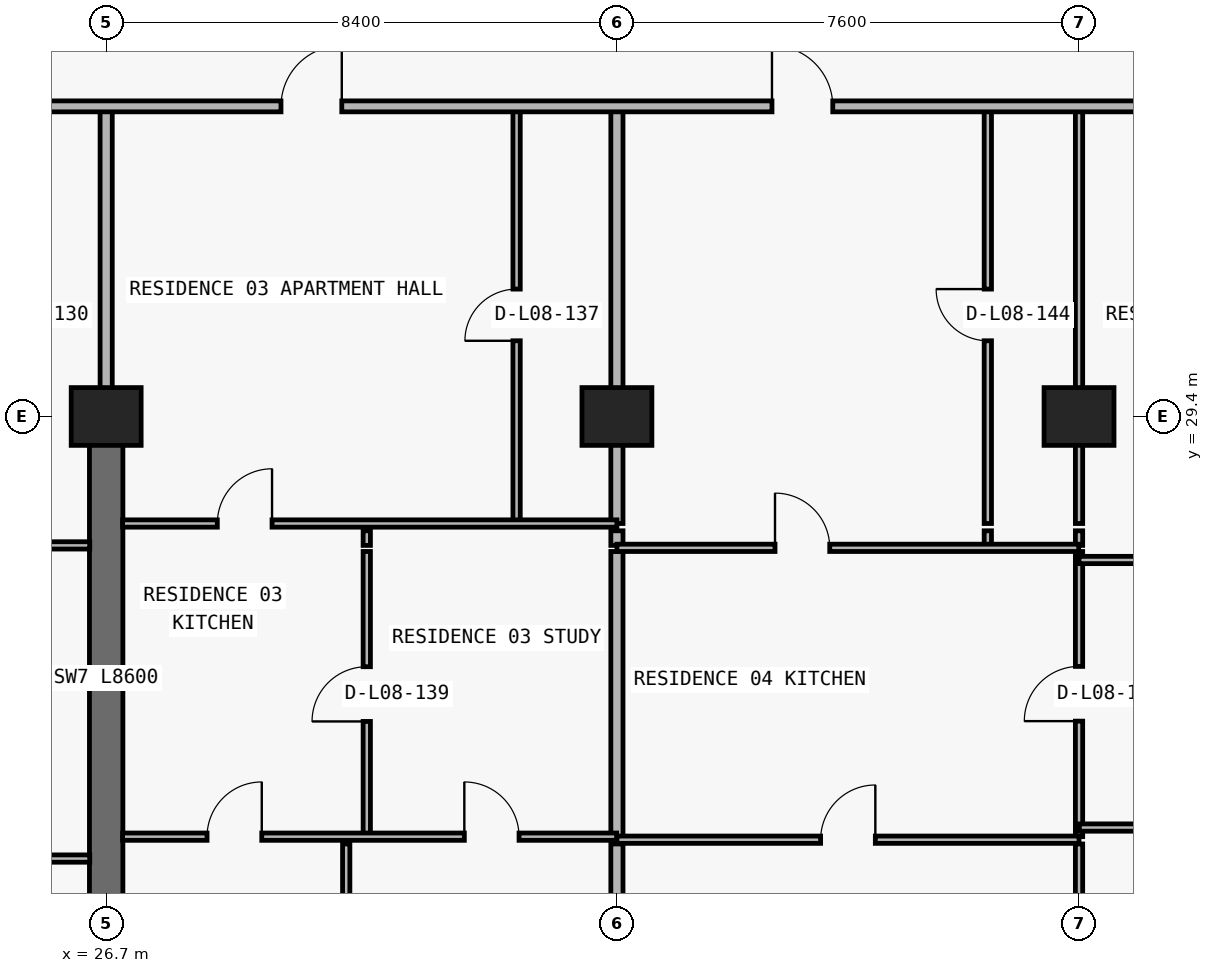
"""IFC4 building model, lengths in metres.
Left out: names, types, materials, properties, quantities, classifications, styles, units other than length and angle.
Written with IfcOpenShell. Run it as: python <this file> out.ifc"""

import sys

from ifc_helpers import new_model, si_unit, direction, frame, frame_2d, origin, origin_2d, place, context, subcontext, project, spatial, rectangle, extrude, element, fill, save


model = new_model("IFC4")
c1 = context("Model", 3, precision=1e-05, world=origin(), true_north=direction((0.0, 1.0)))
c2 = subcontext(c1, "Body", "Model", "MODEL_VIEW")
j1 = project(units=[si_unit("LENGTHUNIT", "METRE"), si_unit("PLANEANGLEUNIT", "RADIAN")], contexts=[c1])
p1 = place(None, origin())
s1 = spatial("IfcSite", under=j1, at=p1, CompositionType="ELEMENT")
p2 = place(p1, origin())
s2 = spatial("IfcBuilding", under=s1, at=p2, CompositionType="ELEMENT")
p3 = place(p2, frame((0.0, 0.0, 36.6)))
s3 = spatial("IfcBuildingStorey", under=s2, at=p3, CompositionType="ELEMENT", Elevation=36.6)
for number, where, z_axis, x_axis in (
    (1, (26.7, 29.4, 0.0), (0.0, 0.0, 1.0), (1.0, 0.0, 0.0)),
    (2, (35.1, 29.4, 0.0), (0.0, 0.0, 1.0), (1.0, 0.0, 0.0)),
    (3, (42.7, 29.4, 0.0), (0.0, 0.0, 1.0), (1.0, 0.0, 0.0)),
):
    element("IfcColumn", number, at=place(p3, frame(where, z_axis=z_axis, x_axis=x_axis)), inside=s3, PredefinedType="COLUMN", context=c2, shape_type="SweptSolid", body=[
        extrude(rectangle(XDim=1.15, YDim=0.95, at=origin_2d()), origin(), (0.0, 0.0, 1.0), 3.05),
    ])
p4 = place(p3, frame((26.7, 20.8, 0.0), z_axis=(0.0, 0.0, 1.0), x_axis=(0.0, 1.0, 0.0)))
e4 = element("IfcWall", 4, at=p4, inside=s3, PredefinedType="SHEAR", context=c2, shape_type="SweptSolid", body=[
    extrude(rectangle(XDim=8.6, YDim=0.55, at=frame_2d((4.3, 0.0))), origin(), (0.0, 0.0, 1.0), 3.05),
])
p5 = place(p3, frame((26.7, 29.405, 0.0), z_axis=(0.0, 0.0, 1.0), x_axis=(0.0, 1.0, 0.0)))
e5 = element("IfcWall", 5, at=p5, inside=s3, PredefinedType="PARTITIONING", context=c2, shape_type="SweptSolid", body=[
    extrude(rectangle(XDim=5.095, YDim=0.2, at=frame_2d((2.547, 0.0))), origin(), (0.0, 0.0, 1.0), 2.335),
])
p6 = place(p3, frame((30.648, 6.24, 0.0), z_axis=(0.0, 0.0, 1.0), x_axis=(0.0, 1.0, 0.0)))
e6 = element("IfcWall", 6, at=p6, inside=s3, PredefinedType="PARTITIONING", context=c2, shape_type="SweptSolid", body=[
    extrude(rectangle(XDim=16.13, YDim=0.12, at=frame_2d((8.065, 0.0))), origin(), (0.0, 0.0, 1.0), 3.05),
])
p7 = place(p3, frame((30.986, 22.49, 0.0), z_axis=(0.0, 0.0, 1.0), x_axis=(0.0, 1.0, 0.0)))
e7 = element("IfcWall", 7, at=p7, inside=s3, PredefinedType="PARTITIONING", context=c2, shape_type="SweptSolid", body=[
    extrude(rectangle(XDim=4.69, YDim=0.12, at=frame_2d((2.345, 0.0))), origin(), (0.0, 0.0, 1.0), 3.05),
])
p8 = place(p7, frame((1.895, 0.0, 0.0)))
e8 = element("IfcOpeningElement", 8, at=p8, cuts=e7, PredefinedType="OPENING", context=c2, shape_type="SweptSolid", body=[
    extrude(rectangle(XDim=0.9, YDim=2.15, at=frame_2d((0.45, 1.075))), frame((0.0, 0.07, 0.0), z_axis=(0.0, -1.0, 0.0), x_axis=(1.0, 0.0, 0.0)), (0.0, 0.0, 1.0), 0.14),
])
p9 = place(p3, frame((30.986, 27.28, 0.0), z_axis=(0.0, 0.0, 1.0), x_axis=(0.0, 1.0, 0.0)))
e9 = element("IfcWall", 9, at=p9, inside=s3, PredefinedType="PARTITIONING", context=c2, shape_type="SweptSolid", body=[
    extrude(rectangle(XDim=0.24, YDim=0.12, at=frame_2d((0.12, 0.0))), origin(), (0.0, 0.0, 1.0), 3.05),
])
p10 = place(p3, frame((33.45, 27.64, 0.0), z_axis=(0.0, 0.0, 1.0), x_axis=(0.0, 1.0, 0.0)))
e10 = element("IfcWall", 10, at=p10, inside=s3, PredefinedType="PARTITIONING", context=c2, shape_type="SweptSolid", body=[
    extrude(rectangle(XDim=6.86, YDim=0.12, at=frame_2d((3.43, 0.0))), origin(), (0.0, 0.0, 1.0), 3.05),
])
p11 = place(p10, frame((3.005, 0.0, 0.0)))
e11 = element("IfcOpeningElement", 11, at=p11, cuts=e10, PredefinedType="OPENING", context=c2, shape_type="SweptSolid", body=[
    extrude(rectangle(XDim=0.85, YDim=2.1, at=frame_2d((0.425, 1.05))), frame((0.0, 0.07, 0.0), z_axis=(0.0, -1.0, 0.0), x_axis=(1.0, 0.0, 0.0)), (0.0, 0.0, 1.0), 0.14),
])
p12 = place(p3, frame((35.1, 6.24, 0.0), z_axis=(0.0, 0.0, 1.0), x_axis=(0.0, 1.0, 0.0)))
e12 = element("IfcWall", 12, at=p12, inside=s3, PredefinedType="PARTITIONING", context=c2, shape_type="SweptSolid", body=[
    extrude(rectangle(XDim=16.13, YDim=0.2, at=frame_2d((8.065, 0.0))), origin(), (0.0, 0.0, 1.0), 2.11),
])
p13 = place(p3, frame((35.1, 22.49, 0.0), z_axis=(0.0, 0.0, 1.0), x_axis=(0.0, 1.0, 0.0)))
e13 = element("IfcWall", 13, at=p13, inside=s3, PredefinedType="PARTITIONING", context=c2, shape_type="SweptSolid", body=[
    extrude(rectangle(XDim=4.69, YDim=0.2, at=frame_2d((2.345, 0.0))), origin(), (0.0, 0.0, 1.0), 2.11),
])
p14 = place(p3, frame((35.1, 27.28, 0.0), z_axis=(0.0, 0.0, 1.0), x_axis=(0.0, 1.0, 0.0)))
e14 = element("IfcWall", 14, at=p14, inside=s3, PredefinedType="PARTITIONING", context=c2, shape_type="SweptSolid", body=[
    extrude(rectangle(XDim=0.24, YDim=0.2, at=frame_2d((0.12, 0.0))), origin(), (0.0, 0.0, 1.0), 2.11),
])
p15 = place(p3, frame((35.1, 27.64, 0.0), z_axis=(0.0, 0.0, 1.0), x_axis=(0.0, 1.0, 0.0)))
e15 = element("IfcWall", 15, at=p15, inside=s3, PredefinedType="PARTITIONING", context=c2, shape_type="SweptSolid", body=[
    extrude(rectangle(XDim=6.86, YDim=0.2, at=frame_2d((3.43, 0.0))), origin(), (0.0, 0.0, 1.0), 2.11),
])
p16 = place(p3, frame((41.2, 27.28, 0.0), z_axis=(0.0, 0.0, 1.0), x_axis=(0.0, 1.0, 0.0)))
e16 = element("IfcWall", 16, at=p16, inside=s3, PredefinedType="PARTITIONING", context=c2, shape_type="SweptSolid", body=[
    extrude(rectangle(XDim=0.24, YDim=0.12, at=frame_2d((0.12, 0.0))), origin(), (0.0, 0.0, 1.0), 3.05),
])
p17 = place(p3, frame((41.2, 27.64, 0.0), z_axis=(0.0, 0.0, 1.0), x_axis=(0.0, 1.0, 0.0)))
e17 = element("IfcWall", 17, at=p17, inside=s3, PredefinedType="PARTITIONING", context=c2, shape_type="SweptSolid", body=[
    extrude(rectangle(XDim=6.86, YDim=0.12, at=frame_2d((3.43, 0.0))), origin(), (0.0, 0.0, 1.0), 3.05),
])
p18 = place(p17, frame((3.005, 0.0, 0.0)))
e18 = element("IfcOpeningElement", 18, at=p18, cuts=e17, PredefinedType="OPENING", context=c2, shape_type="SweptSolid", body=[
    extrude(rectangle(XDim=0.85, YDim=2.1, at=frame_2d((0.425, 1.05))), frame((0.0, 0.07, 0.0), z_axis=(0.0, -1.0, 0.0), x_axis=(1.0, 0.0, 0.0)), (0.0, 0.0, 1.0), 0.14),
])
p19 = place(p3, frame((42.7, 6.24, 0.0), z_axis=(0.0, 0.0, 1.0), x_axis=(0.0, 1.0, 0.0)))
e19 = element("IfcWall", 19, at=p19, inside=s3, PredefinedType="PARTITIONING", context=c2, shape_type="SweptSolid", body=[
    extrude(rectangle(XDim=16.13, YDim=0.12, at=frame_2d((8.065, 0.0))), origin(), (0.0, 0.0, 1.0), 2.11),
])
p20 = place(p3, frame((42.7, 22.49, 0.0), z_axis=(0.0, 0.0, 1.0), x_axis=(0.0, 1.0, 0.0)))
e20 = element("IfcWall", 20, at=p20, inside=s3, PredefinedType="PARTITIONING", context=c2, shape_type="SweptSolid", body=[
    extrude(rectangle(XDim=4.69, YDim=0.12, at=frame_2d((2.345, 0.0))), origin(), (0.0, 0.0, 1.0), 2.11),
])
p21 = place(p20, frame((1.9, 0.0, 0.0)))
e21 = element("IfcOpeningElement", 21, at=p21, cuts=e20, PredefinedType="OPENING", context=c2, shape_type="SweptSolid", body=[
    extrude(rectangle(XDim=0.9, YDim=2.06, at=frame_2d((0.45, 1.03))), frame((0.0, 0.07, 0.0), z_axis=(0.0, -1.0, 0.0), x_axis=(1.0, 0.0, 0.0)), (0.0, 0.0, 1.0), 0.14),
])
p22 = place(p3, frame((42.7, 27.28, 0.0), z_axis=(0.0, 0.0, 1.0), x_axis=(0.0, 1.0, 0.0)))
e22 = element("IfcWall", 22, at=p22, inside=s3, PredefinedType="PARTITIONING", context=c2, shape_type="SweptSolid", body=[
    extrude(rectangle(XDim=0.24, YDim=0.12, at=frame_2d((0.12, 0.0))), origin(), (0.0, 0.0, 1.0), 2.11),
])
p23 = place(p3, frame((42.7, 27.64, 0.0), z_axis=(0.0, 0.0, 1.0), x_axis=(0.0, 1.0, 0.0)))
e23 = element("IfcWall", 23, at=p23, inside=s3, PredefinedType="PARTITIONING", context=c2, shape_type="SweptSolid", body=[
    extrude(rectangle(XDim=6.86, YDim=0.12, at=frame_2d((3.43, 0.0))), origin(), (0.0, 0.0, 1.0), 2.11),
])
p24 = place(p3, frame((18.3, 22.13, 0.0), z_axis=(0.0, 0.0, 1.0), x_axis=(1.0, 0.0, 0.0)))
e24 = element("IfcWall", 24, at=p24, inside=s3, PredefinedType="PARTITIONING", context=c2, shape_type="SweptSolid", body=[
    extrude(rectangle(XDim=8.13, YDim=0.12, at=frame_2d((4.065, 0.0))), origin(), (0.0, 0.0, 1.0), 3.05),
])
p25 = place(p24, frame((1.86, 0.0, 0.0)))
e25 = element("IfcOpeningElement", 25, at=p25, cuts=e24, PredefinedType="OPENING", context=c2, shape_type="SweptSolid", body=[
    extrude(rectangle(XDim=0.9, YDim=2.15, at=frame_2d((0.45, 1.075))), frame((0.0, 0.07, 0.0), z_axis=(0.0, -1.0, 0.0), x_axis=(1.0, 0.0, 0.0)), (0.0, 0.0, 1.0), 0.14),
])
p26 = place(p24, frame((6.008, 0.0, 0.0)))
e26 = element("IfcOpeningElement", 26, at=p26, cuts=e24, PredefinedType="OPENING", context=c2, shape_type="SweptSolid", body=[
    extrude(rectangle(XDim=0.9, YDim=2.15, at=frame_2d((0.45, 1.075))), frame((0.0, 0.07, 0.0), z_axis=(0.0, -1.0, 0.0), x_axis=(1.0, 0.0, 0.0)), (0.0, 0.0, 1.0), 0.14),
])
p27 = place(p3, frame((35.1, 22.44, 0.0), z_axis=(0.0, 0.0, 1.0), x_axis=(1.0, 0.0, 0.0)))
e27 = element("IfcWall", 27, at=p27, inside=s3, PredefinedType="PARTITIONING", context=c2, shape_type="SweptSolid", body=[
    extrude(rectangle(XDim=7.6, YDim=0.12, at=frame_2d((3.8, 0.0))), origin(), (0.0, 0.0, 1.0), 3.05),
])
p28 = place(p27, frame((3.35, 0.0, 0.0)))
e28 = element("IfcOpeningElement", 28, at=p28, cuts=e27, PredefinedType="OPENING", context=c2, shape_type="SweptSolid", body=[
    extrude(rectangle(XDim=0.9, YDim=2.15, at=frame_2d((0.45, 1.075))), frame((0.0, 0.07, 0.0), z_axis=(0.0, -1.0, 0.0), x_axis=(1.0, 0.0, 0.0)), (0.0, 0.0, 1.0), 0.14),
])
p29 = place(p3, frame((26.97, 22.49, 0.0), z_axis=(0.0, 0.0, 1.0), x_axis=(1.0, 0.0, 0.0)))
e29 = element("IfcWall", 29, at=p29, inside=s3, PredefinedType="PARTITIONING", context=c2, shape_type="SweptSolid", body=[
    extrude(rectangle(XDim=8.125, YDim=0.12, at=frame_2d((4.062, 0.0))), origin(), (0.0, 0.0, 1.0), 3.05),
])
p30 = place(p29, frame((1.389, 0.0, 0.0)))
e30 = element("IfcOpeningElement", 30, at=p30, cuts=e29, PredefinedType="OPENING", context=c2, shape_type="SweptSolid", body=[
    extrude(rectangle(XDim=0.9, YDim=2.15, at=frame_2d((0.45, 1.075))), frame((0.0, 0.07, 0.0), z_axis=(0.0, -1.0, 0.0), x_axis=(1.0, 0.0, 0.0)), (0.0, 0.0, 1.0), 0.14),
])
p31 = place(p29, frame((5.621, 0.0, 0.0)))
e31 = element("IfcOpeningElement", 31, at=p31, cuts=e29, PredefinedType="OPENING", context=c2, shape_type="SweptSolid", body=[
    extrude(rectangle(XDim=0.9, YDim=2.15, at=frame_2d((0.45, 1.075))), frame((0.0, 0.07, 0.0), z_axis=(0.0, -1.0, 0.0), x_axis=(1.0, 0.0, 0.0)), (0.0, 0.0, 1.0), 0.14),
])
p32 = place(p3, frame((42.705, 22.64, 0.0), z_axis=(0.0, 0.0, 1.0), x_axis=(1.0, 0.0, 0.0)))
e32 = element("IfcWall", 32, at=p32, inside=s3, PredefinedType="PARTITIONING", context=c2, shape_type="SweptSolid", body=[
    extrude(rectangle(XDim=8.125, YDim=0.12, at=frame_2d((4.062, 0.0))), origin(), (0.0, 0.0, 1.0), 3.05),
])
p33 = place(p32, frame((3.613, 0.0, 0.0)))
e33 = element("IfcOpeningElement", 33, at=p33, cuts=e32, PredefinedType="OPENING", context=c2, shape_type="SweptSolid", body=[
    extrude(rectangle(XDim=0.9, YDim=2.15, at=frame_2d((0.45, 1.075))), frame((0.0, 0.07, 0.0), z_axis=(0.0, -1.0, 0.0), x_axis=(1.0, 0.0, 0.0)), (0.0, 0.0, 1.0), 0.14),
])
p34 = place(p3, frame((42.7, 27.04, 0.0), z_axis=(0.0, 0.0, 1.0), x_axis=(1.0, 0.0, 0.0)))
e34 = element("IfcWall", 34, at=p34, inside=s3, PredefinedType="PARTITIONING", context=c2, shape_type="SweptSolid", body=[
    extrude(rectangle(XDim=8.13, YDim=0.12, at=frame_2d((4.065, 0.0))), origin(), (0.0, 0.0, 1.0), 3.05),
])
p35 = place(p34, frame((3.0, 0.0, 0.0)))
e35 = element("IfcOpeningElement", 35, at=p35, cuts=e34, PredefinedType="OPENING", context=c2, shape_type="SweptSolid", body=[
    extrude(rectangle(XDim=0.9, YDim=2.15, at=frame_2d((0.45, 1.075))), frame((0.0, 0.07, 0.0), z_axis=(0.0, -1.0, 0.0), x_axis=(1.0, 0.0, 0.0)), (0.0, 0.0, 1.0), 0.14),
])
p36 = place(p3, frame((35.1, 27.24, 0.0), z_axis=(0.0, 0.0, 1.0), x_axis=(1.0, 0.0, 0.0)))
e36 = element("IfcWall", 36, at=p36, inside=s3, PredefinedType="PARTITIONING", context=c2, shape_type="SweptSolid", body=[
    extrude(rectangle(XDim=7.595, YDim=0.12, at=frame_2d((3.797, 0.0))), origin(), (0.0, 0.0, 1.0), 3.05),
])
p37 = place(p36, frame((2.6, 0.0, 0.0)))
e37 = element("IfcOpeningElement", 37, at=p37, cuts=e36, PredefinedType="OPENING", context=c2, shape_type="SweptSolid", body=[
    extrude(rectangle(XDim=0.9, YDim=2.15, at=frame_2d((0.45, 1.075))), frame((0.0, 0.07, 0.0), z_axis=(0.0, -1.0, 0.0), x_axis=(1.0, 0.0, 0.0)), (0.0, 0.0, 1.0), 0.14),
])
p38 = place(p3, frame((18.3, 27.28, 0.0), z_axis=(0.0, 0.0, 1.0), x_axis=(1.0, 0.0, 0.0)))
e38 = element("IfcWall", 38, at=p38, inside=s3, PredefinedType="PARTITIONING", context=c2, shape_type="SweptSolid", body=[
    extrude(rectangle(XDim=8.13, YDim=0.12, at=frame_2d((4.065, 0.0))), origin(), (0.0, 0.0, 1.0), 3.05),
])
p39 = place(p38, frame((1.943, 0.0, 0.0)))
e39 = element("IfcOpeningElement", 39, at=p39, cuts=e38, PredefinedType="OPENING", context=c2, shape_type="SweptSolid", body=[
    extrude(rectangle(XDim=0.9, YDim=2.15, at=frame_2d((0.45, 1.075))), frame((0.0, 0.07, 0.0), z_axis=(0.0, -1.0, 0.0), x_axis=(1.0, 0.0, 0.0)), (0.0, 0.0, 1.0), 0.14),
])
p40 = place(p3, frame((26.97, 27.64, 0.0), z_axis=(0.0, 0.0, 1.0), x_axis=(1.0, 0.0, 0.0)))
e40 = element("IfcWall", 40, at=p40, inside=s3, PredefinedType="PARTITIONING", context=c2, shape_type="SweptSolid", body=[
    extrude(rectangle(XDim=8.13, YDim=0.12, at=frame_2d((4.065, 0.0))), origin(), (0.0, 0.0, 1.0), 3.05),
])
p41 = place(p40, frame((1.558, 0.0, 0.0)))
e41 = element("IfcOpeningElement", 41, at=p41, cuts=e40, PredefinedType="OPENING", context=c2, shape_type="SweptSolid", body=[
    extrude(rectangle(XDim=0.9, YDim=2.15, at=frame_2d((0.45, 1.075))), frame((0.0, 0.07, 0.0), z_axis=(0.0, -1.0, 0.0), x_axis=(1.0, 0.0, 0.0)), (0.0, 0.0, 1.0), 0.14),
])
p42 = place(p3, frame((5.105, 34.5, 0.0), z_axis=(0.0, 0.0, 1.0), x_axis=(1.0, 0.0, 0.0)))
e42 = element("IfcWall", 42, at=p42, inside=s3, PredefinedType="PARTITIONING", context=c2, shape_type="SweptSolid", body=[
    extrude(rectangle(XDim=50.781, YDim=0.18, at=frame_2d((25.391, 0.0))), origin(), (0.0, 0.0, 1.0), 3.05),
])
p43 = place(p42, frame((7.67, 0.0, 0.0)))
e43 = element("IfcOpeningElement", 43, at=p43, cuts=e42, PredefinedType="OPENING", context=c2, shape_type="SweptSolid", body=[
    extrude(rectangle(XDim=1.0, YDim=2.2, at=frame_2d((0.5, 1.1))), frame((0.0, 0.1, 0.0), z_axis=(0.0, -1.0, 0.0), x_axis=(1.0, 0.0, 0.0)), (0.0, 0.0, 1.0), 0.2),
])
p44 = place(p42, frame((16.07, 0.0, 0.0)))
e44 = element("IfcOpeningElement", 44, at=p44, cuts=e42, PredefinedType="OPENING", context=c2, shape_type="SweptSolid", body=[
    extrude(rectangle(XDim=1.0, YDim=2.2, at=frame_2d((0.5, 1.1))), frame((0.0, 0.1, 0.0), z_axis=(0.0, -1.0, 0.0), x_axis=(1.0, 0.0, 0.0)), (0.0, 0.0, 1.0), 0.2),
])
p45 = place(p42, frame((24.47, 0.0, 0.0)))
e45 = element("IfcOpeningElement", 45, at=p45, cuts=e42, PredefinedType="OPENING", context=c2, shape_type="SweptSolid", body=[
    extrude(rectangle(XDim=1.0, YDim=2.2, at=frame_2d((0.5, 1.1))), frame((0.0, 0.1, 0.0), z_axis=(0.0, -1.0, 0.0), x_axis=(1.0, 0.0, 0.0)), (0.0, 0.0, 1.0), 0.2),
])
p46 = place(p42, frame((32.545, 0.0, 0.0)))
e46 = element("IfcOpeningElement", 46, at=p46, cuts=e42, PredefinedType="OPENING", context=c2, shape_type="SweptSolid", body=[
    extrude(rectangle(XDim=1.0, YDim=2.2, at=frame_2d((0.5, 1.1))), frame((0.0, 0.1, 0.0), z_axis=(0.0, -1.0, 0.0), x_axis=(1.0, 0.0, 0.0)), (0.0, 0.0, 1.0), 0.2),
])
p47 = place(p42, frame((47.888, 0.0, 0.0)))
e47 = element("IfcOpeningElement", 47, at=p47, cuts=e42, PredefinedType="OPENING", context=c2, shape_type="SweptSolid", body=[
    extrude(rectangle(XDim=1.0, YDim=2.2, at=frame_2d((0.5, 1.1))), frame((0.0, 0.1, 0.0), z_axis=(0.0, -1.0, 0.0), x_axis=(1.0, 0.0, 0.0)), (0.0, 0.0, 1.0), 0.2),
])
p48 = place(p45, origin())
e48 = element("IfcDoor", 48, at=p48, inside=s3, OperationType="SINGLE_SWING_RIGHT", PredefinedType="DOOR", context=c2, shape_type="SweptSolid", body=[
    extrude(rectangle(XDim=1.0, YDim=2.2, at=frame_2d((0.5, 1.1))), frame((0.0, 0.025, 0.0), z_axis=(0.0, -1.0, 0.0), x_axis=(1.0, 0.0, 0.0)), (0.0, 0.0, 1.0), 0.05),
])
fill(e45, e48)
p49 = place(p11, origin())
e49 = element("IfcDoor", 49, at=p49, inside=s3, OperationType="SINGLE_SWING_LEFT", PredefinedType="DOOR", context=c2, shape_type="SweptSolid", body=[
    extrude(rectangle(XDim=0.85, YDim=2.1, at=frame_2d((0.425, 1.05))), frame((0.0, 0.025, 0.0), z_axis=(0.0, -1.0, 0.0), x_axis=(1.0, 0.0, 0.0)), (0.0, 0.0, 1.0), 0.05),
])
fill(e11, e49)
p50 = place(p41, origin())
e50 = element("IfcDoor", 50, at=p50, inside=s3, OperationType="SINGLE_SWING_RIGHT", PredefinedType="DOOR", context=c2, shape_type="SweptSolid", body=[
    extrude(rectangle(XDim=0.9, YDim=2.15, at=frame_2d((0.45, 1.075))), frame((0.0, 0.025, 0.0), z_axis=(0.0, -1.0, 0.0), x_axis=(1.0, 0.0, 0.0)), (0.0, 0.0, 1.0), 0.05),
])
fill(e41, e50)
p51 = place(p8, origin())
e51 = element("IfcDoor", 51, at=p51, inside=s3, OperationType="SINGLE_SWING_LEFT", PredefinedType="DOOR", context=c2, shape_type="SweptSolid", body=[
    extrude(rectangle(XDim=0.9, YDim=2.15, at=frame_2d((0.45, 1.075))), frame((0.0, 0.025, 0.0), z_axis=(0.0, -1.0, 0.0), x_axis=(1.0, 0.0, 0.0)), (0.0, 0.0, 1.0), 0.05),
])
fill(e8, e51)
p52 = place(p30, origin())
e52 = element("IfcDoor", 52, at=p52, inside=s3, OperationType="SINGLE_SWING_RIGHT", PredefinedType="DOOR", context=c2, shape_type="SweptSolid", body=[
    extrude(rectangle(XDim=0.9, YDim=2.15, at=frame_2d((0.45, 1.075))), frame((0.0, 0.025, 0.0), z_axis=(0.0, -1.0, 0.0), x_axis=(1.0, 0.0, 0.0)), (0.0, 0.0, 1.0), 0.05),
])
fill(e30, e52)
p53 = place(p31, origin())
e53 = element("IfcDoor", 53, at=p53, inside=s3, OperationType="SINGLE_SWING_LEFT", PredefinedType="DOOR", context=c2, shape_type="SweptSolid", body=[
    extrude(rectangle(XDim=0.9, YDim=2.15, at=frame_2d((0.45, 1.075))), frame((0.0, 0.025, 0.0), z_axis=(0.0, -1.0, 0.0), x_axis=(1.0, 0.0, 0.0)), (0.0, 0.0, 1.0), 0.05),
])
fill(e31, e53)
p54 = place(p46, origin())
e54 = element("IfcDoor", 54, at=p54, inside=s3, OperationType="SINGLE_SWING_LEFT", PredefinedType="DOOR", context=c2, shape_type="SweptSolid", body=[
    extrude(rectangle(XDim=1.0, YDim=2.2, at=frame_2d((0.5, 1.1))), frame((0.0, 0.025, 0.0), z_axis=(0.0, -1.0, 0.0), x_axis=(1.0, 0.0, 0.0)), (0.0, 0.0, 1.0), 0.05),
])
fill(e46, e54)
p55 = place(p18, origin())
e55 = element("IfcDoor", 55, at=p55, inside=s3, OperationType="SINGLE_SWING_RIGHT", PredefinedType="DOOR", context=c2, shape_type="SweptSolid", body=[
    extrude(rectangle(XDim=0.85, YDim=2.1, at=frame_2d((0.425, 1.05))), frame((0.0, 0.025, 0.0), z_axis=(0.0, -1.0, 0.0), x_axis=(1.0, 0.0, 0.0)), (0.0, 0.0, 1.0), 0.05),
])
fill(e18, e55)
p56 = place(p37, origin())
e56 = element("IfcDoor", 56, at=p56, inside=s3, OperationType="SINGLE_SWING_LEFT", PredefinedType="DOOR", context=c2, shape_type="SweptSolid", body=[
    extrude(rectangle(XDim=0.9, YDim=2.15, at=frame_2d((0.45, 1.075))), frame((0.0, 0.025, 0.0), z_axis=(0.0, -1.0, 0.0), x_axis=(1.0, 0.0, 0.0)), (0.0, 0.0, 1.0), 0.05),
])
fill(e37, e56)
p57 = place(p28, origin())
e57 = element("IfcDoor", 57, at=p57, inside=s3, OperationType="SINGLE_SWING_RIGHT", PredefinedType="DOOR", context=c2, shape_type="SweptSolid", body=[
    extrude(rectangle(XDim=0.9, YDim=2.15, at=frame_2d((0.45, 1.075))), frame((0.0, 0.025, 0.0), z_axis=(0.0, -1.0, 0.0), x_axis=(1.0, 0.0, 0.0)), (0.0, 0.0, 1.0), 0.05),
])
fill(e28, e57)
p58 = place(p21, origin())
e58 = element("IfcDoor", 58, at=p58, inside=s3, OperationType="SINGLE_SWING_LEFT", PredefinedType="DOOR", context=c2, shape_type="SweptSolid", body=[
    extrude(rectangle(XDim=0.9, YDim=2.06, at=frame_2d((0.45, 1.03))), frame((0.0, 0.025, 0.0), z_axis=(0.0, -1.0, 0.0), x_axis=(1.0, 0.0, 0.0)), (0.0, 0.0, 1.0), 0.05),
])
fill(e21, e58)
save(model, sys.argv[1])
